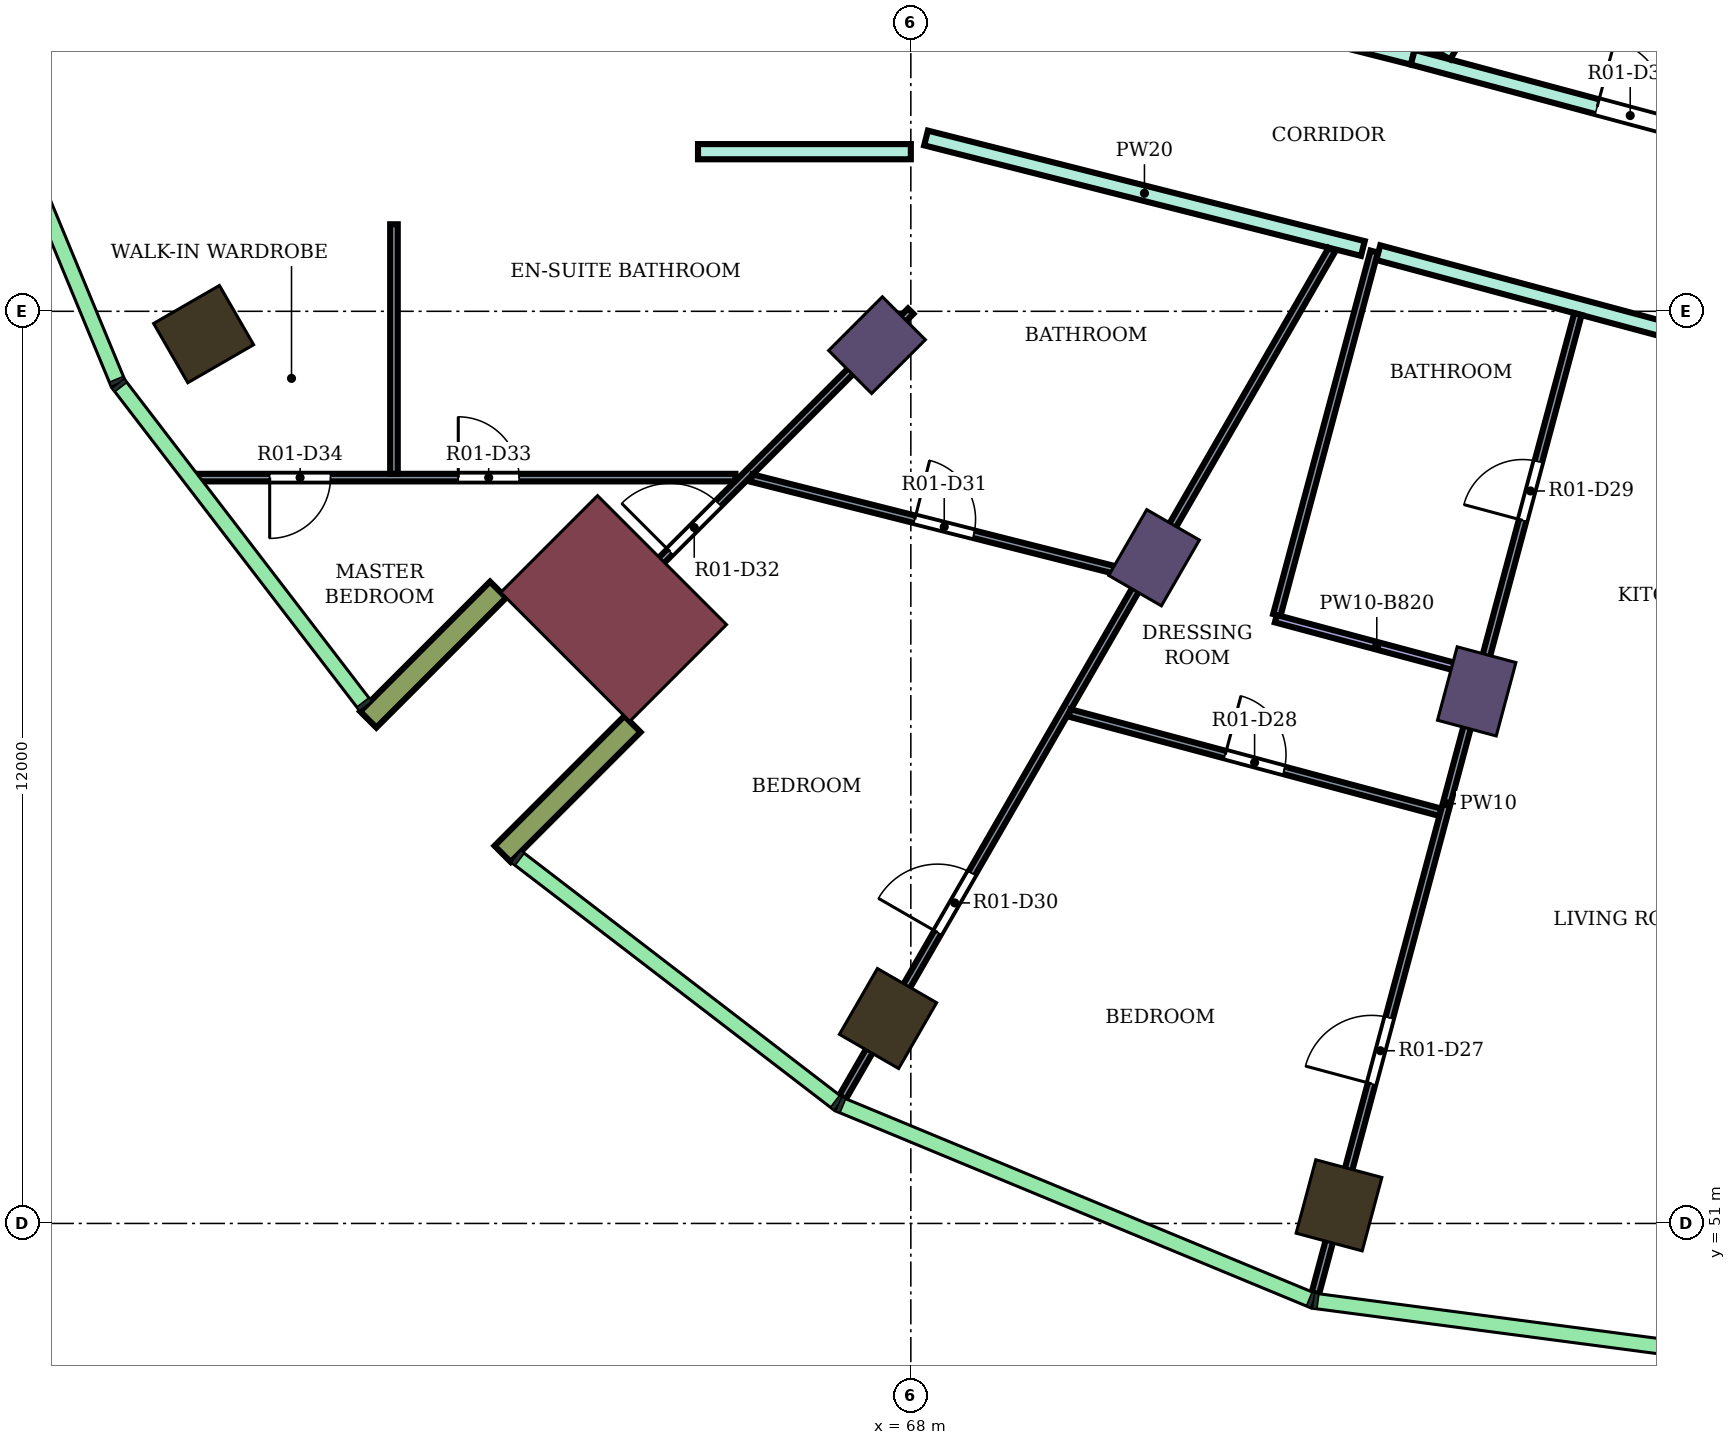
"""IFC4 building model, lengths in metres.
Left out: names, types, materials, properties, quantities, classifications, styles, units other than length and angle.
Written with IfcOpenShell. Run it as: python <this file> out.ifc"""

import sys

from ifc_helpers import new_model, si_unit, direction, frame, frame_2d, origin, origin_2d, place, context, subcontext, project, spatial, rectangle, extrude, element, fill, save


model = new_model("IFC4")
c1 = context("Model", 3, precision=1e-05, world=origin(), true_north=direction((0.0, 1.0)))
c2 = subcontext(c1, "Body", "Model", "MODEL_VIEW")
j1 = project(units=[si_unit("LENGTHUNIT", "METRE"), si_unit("PLANEANGLEUNIT", "RADIAN")], contexts=[c1])
p1 = place(None, origin())
s1 = spatial("IfcSite", under=j1, at=p1, CompositionType="ELEMENT")
p2 = place(p1, origin())
s2 = spatial("IfcBuilding", under=s1, at=p2, CompositionType="ELEMENT")
p3 = place(p2, frame((0.0, 0.0, 161.8)))
s3 = spatial("IfcBuildingStorey", under=s2, at=p3, CompositionType="ELEMENT", Elevation=161.8)
for number, where, z_axis, x_axis in (
    (1, (58.696, 62.7, 0.0), (0.0, 0.0, 1.0), (-0.866, -0.5, 0.0)),
    (2, (67.7, 53.696, 0.0), (0.0, 0.0, 1.0), (-0.5, -0.866, 0.0)),
    (3, (73.633, 51.238, 0.0), (0.0, 0.0, 1.0), (-0.259, -0.966, 0.0)),
):
    element("IfcColumn", number, at=place(p3, frame(where, z_axis=z_axis, x_axis=x_axis)), inside=s3, PredefinedType="COLUMN", context=c2, shape_type="SweptSolid", body=[
        extrude(rectangle(XDim=1.0, YDim=0.9, at=origin_2d()), origin(), (0.0, 0.0, 1.0), 4.1),
    ])
for number, where, z_axis, x_axis in (
    (4, (67.555, 62.555, 0.0), (0.0, 0.0, 1.0), (-0.707, -0.707, 0.0)),
    (5, (71.2, 59.758, 0.0), (0.0, 0.0, 1.0), (-0.5, -0.866, 0.0)),
    (6, (75.445, 58.0, 0.0), (0.0, 0.0, 1.0), (-0.259, -0.966, 0.0)),
):
    element("IfcColumn", number, at=place(p3, frame(where, z_axis=z_axis, x_axis=x_axis)), inside=s3, PredefinedType="COLUMN", context=c2, shape_type="SweptSolid", body=[
        extrude(rectangle(XDim=1.0, YDim=0.8, at=origin_2d()), origin(), (0.0, 0.0, 1.0), 4.1),
    ])
p4 = place(p3, frame((64.09, 59.09, 0.0), z_axis=(0.0, 0.0, 1.0), x_axis=(-0.707106781187, -0.707106781187, 0.0)))
e7 = element("IfcColumn", 7, at=p4, inside=s3, PredefinedType="COLUMN", context=c2, shape_type="SweptSolid", body=[
    extrude(rectangle(XDim=1.8, YDim=2.4, at=origin_2d()), origin(), (0.0, 0.0, 1.0), 4.1),
])
for number, where, z_axis, x_axis in (
    (8, (62.57, 59.338, 0.0), (0.0, 0.0, 1.0), (-0.707, -0.707, 0.0)),
    (9, (64.338, 57.57, 0.0), (0.0, 0.0, 1.0), (-0.707, -0.707, 0.0)),
):
    element("IfcWall", number, at=place(p3, frame(where, z_axis=z_axis, x_axis=x_axis)), inside=s3, PredefinedType="NOTDEFINED", context=c2, shape_type="SweptSolid", body=[
        extrude(rectangle(XDim=2.416, YDim=0.3, at=frame_2d((1.208, 0.0))), origin(), (0.0, 0.0, 1.0), 4.1),
    ])
p5 = place(p3, frame((65.2, 65.1, 0.0), z_axis=(0.0, 0.0, 1.0), x_axis=(1.0, 0.0, 0.0)))
e10 = element("IfcWall", 10, at=p5, inside=s3, PredefinedType="PARTITIONING", context=c2, shape_type="SweptSolid", body=[
    extrude(rectangle(XDim=2.8, YDim=0.2, at=frame_2d((1.4, 0.0))), origin(), (0.0, 0.0, 1.0), 3.65),
])
p6 = place(p3, frame((68.2, 65.28, 0.0), z_axis=(0.0, 0.0, 1.0), x_axis=(0.969450596516, -0.245286650503, 0.0)))
e11 = element("IfcWall", 11, at=p6, inside=s3, PredefinedType="PARTITIONING", context=c2, shape_type="SweptSolid", body=[
    extrude(rectangle(XDim=5.928, YDim=0.2, at=frame_2d((2.964, 0.0))), origin(), (0.0, 0.0, 1.0), 3.65),
])
p7 = place(p3, frame((72.1, 66.975, 0.0), z_axis=(0.0, 0.0, 1.0), x_axis=(0.969471314457, -0.245204752086, 0.0)))
e12 = element("IfcWall", 12, at=p7, inside=s3, PredefinedType="PARTITIONING", context=c2, shape_type="SweptSolid", body=[
    extrude(rectangle(XDim=2.582, YDim=0.2, at=frame_2d((1.291, 0.0))), origin(), (0.0, 0.0, 1.0), 3.65),
])
p8 = place(p7, frame((0.841, 0.0, 0.0)))
e13 = element("IfcOpeningElement", 13, at=p8, cuts=e12, PredefinedType="OPENING", context=c2, shape_type="SweptSolid", body=[
    extrude(rectangle(XDim=0.9, YDim=2.1, at=frame_2d((0.45, 1.05))), frame((0.0, 0.11, 0.0), z_axis=(0.0, -1.0, 0.0), x_axis=(1.0, 0.0, 0.0)), (0.0, 0.0, 1.0), 0.22),
])
p9 = place(p3, frame((74.15, 63.772, 0.0), z_axis=(0.0, 0.0, 1.0), x_axis=(0.965807109237, -0.259261697417, 0.0)))
e14 = element("IfcWall", 14, at=p9, inside=s3, PredefinedType="PARTITIONING", context=c2, shape_type="SweptSolid", body=[
    extrude(rectangle(XDim=5.967, YDim=0.2, at=frame_2d((2.983, 0.0))), origin(), (0.0, 0.0, 1.0), 3.65),
])
p10 = place(p9, frame((4.507, 0.0, 0.0)))
e15 = element("IfcOpeningElement", 15, at=p10, cuts=e14, PredefinedType="OPENING", context=c2, shape_type="SweptSolid", body=[
    extrude(rectangle(XDim=1.0, YDim=2.1, at=frame_2d((0.5, 1.05))), frame((0.0, 0.11, 0.0), z_axis=(0.0, -1.0, 0.0), x_axis=(1.0, 0.0, 0.0)), (0.0, 0.0, 1.0), 0.22),
])
p11 = place(p3, frame((74.603, 66.342, 0.0), z_axis=(0.0, 0.0, 1.0), x_axis=(0.965920893652, -0.258837453254, 0.0)))
e16 = element("IfcWall", 16, at=p11, inside=s3, PredefinedType="PARTITIONING", context=c2, shape_type="SweptSolid", body=[
    extrude(rectangle(XDim=5.458, YDim=0.2, at=frame_2d((2.729, 0.0))), origin(), (0.0, 0.0, 1.0), 3.65),
])
p12 = place(p11, frame((2.512, 0.0, 0.0)))
e17 = element("IfcOpeningElement", 17, at=p12, cuts=e16, PredefinedType="OPENING", context=c2, shape_type="SweptSolid", body=[
    extrude(rectangle(XDim=0.9, YDim=2.1, at=frame_2d((0.45, 1.05))), frame((0.0, 0.11, 0.0), z_axis=(0.0, -1.0, 0.0), x_axis=(1.0, 0.0, 0.0)), (0.0, 0.0, 1.0), 0.22),
])
p13 = place(p3, frame((75.01, 66.364, 0.0), z_axis=(0.0, 0.0, 1.0), x_axis=(0.50017749597, 0.865922902183, 0.0)))
e18 = element("IfcWall", 18, at=p13, inside=s3, PredefinedType="PARTITIONING", context=c2, shape_type="SweptSolid", body=[
    extrude(rectangle(XDim=2.276, YDim=0.2, at=frame_2d((1.138, 0.0))), origin(), (0.0, 0.0, 1.0), 3.65),
])
p14 = place(p3, frame((58.6, 60.812, 0.0), z_axis=(0.0, 0.0, 1.0), x_axis=(1.0, 0.0, 0.0)))
e19 = element("IfcWall", 19, at=p14, inside=s3, PredefinedType="PARTITIONING", context=c2, shape_type="SweptSolid", body=[
    extrude(rectangle(XDim=7.092, YDim=0.1, at=frame_2d((3.546, 0.0))), origin(), (0.0, 0.0, 1.0), 3.65),
])
p15 = place(p14, frame((3.446, 0.0, 0.0)))
e20 = element("IfcOpeningElement", 20, at=p15, cuts=e19, PredefinedType="OPENING", context=c2, shape_type="SweptSolid", body=[
    extrude(rectangle(XDim=0.8, YDim=2.1, at=frame_2d((0.4, 1.05))), frame((0.0, 0.06, 0.0), z_axis=(0.0, -1.0, 0.0), x_axis=(1.0, 0.0, 0.0)), (0.0, 0.0, 1.0), 0.12),
])
p16 = place(p14, frame((0.965, 0.0, 0.0)))
e21 = element("IfcOpeningElement", 21, at=p16, cuts=e19, PredefinedType="OPENING", context=c2, shape_type="SweptSolid", body=[
    extrude(rectangle(XDim=0.8, YDim=2.1, at=frame_2d((0.4, 1.05))), frame((0.0, 0.06, 0.0), z_axis=(0.0, -1.0, 0.0), x_axis=(1.0, 0.0, 0.0)), (0.0, 0.0, 1.0), 0.12),
])
p17 = place(p3, frame((61.2, 60.862, 0.0), z_axis=(0.0, 0.0, 1.0), x_axis=(0.0, 1.0, 0.0)))
e22 = element("IfcWall", 22, at=p17, inside=s3, PredefinedType="PARTITIONING", context=c2, shape_type="SweptSolid", body=[
    extrude(rectangle(XDim=3.283, YDim=0.1, at=frame_2d((1.642, 0.0))), origin(), (0.0, 0.0, 1.0), 3.65),
])
p18 = place(p3, frame((63.593, 58.598, 0.0), z_axis=(0.0, 0.0, 1.0), x_axis=(0.707243952197, 0.706969583561, 0.0)))
e23 = element("IfcWall", 23, at=p18, inside=s3, PredefinedType="PARTITIONING", context=c2, shape_type="SweptSolid", body=[
    extrude(rectangle(XDim=6.229, YDim=0.1, at=frame_2d((3.114, 0.0))), origin(), (0.0, 0.0, 1.0), 3.65),
])
p19 = place(p18, frame((1.752, 0.0, 0.0)))
e24 = element("IfcOpeningElement", 24, at=p19, cuts=e23, PredefinedType="OPENING", context=c2, shape_type="SweptSolid", body=[
    extrude(rectangle(XDim=0.9, YDim=2.1, at=frame_2d((0.45, 1.05))), frame((0.0, 0.06, 0.0), z_axis=(0.0, -1.0, 0.0), x_axis=(1.0, 0.0, 0.0)), (0.0, 0.0, 1.0), 0.12),
])
p20 = place(p3, frame((65.904, 60.806, 0.0), z_axis=(0.0, 0.0, 1.0), x_axis=(0.969477107154, -0.245181848237, 0.0)))
e25 = element("IfcWall", 25, at=p20, inside=s3, PredefinedType="PARTITIONING", context=c2, shape_type="SweptSolid", body=[
    extrude(rectangle(XDim=5.252, YDim=0.1, at=frame_2d((2.626, 0.0))), origin(), (0.0, 0.0, 1.0), 3.65),
])
p21 = place(p20, frame((2.216, 0.0, 0.0)))
e26 = element("IfcOpeningElement", 26, at=p21, cuts=e25, PredefinedType="OPENING", context=c2, shape_type="SweptSolid", body=[
    extrude(rectangle(XDim=0.8, YDim=2.1, at=frame_2d((0.4, 1.05))), frame((0.0, 0.06, 0.0), z_axis=(0.0, -1.0, 0.0), x_axis=(1.0, 0.0, 0.0)), (0.0, 0.0, 1.0), 0.12),
])
p22 = place(p3, frame((67.101, 52.659, 0.0), z_axis=(0.0, 0.0, 1.0), x_axis=(0.499985055897, 0.866034031594, 0.0)))
e27 = element("IfcWall", 27, at=p22, inside=s3, PredefinedType="PARTITIONING", context=c2, shape_type="SweptSolid", body=[
    extrude(rectangle(XDim=12.876, YDim=0.1, at=frame_2d((6.438, 0.0))), origin(), (0.0, 0.0, 1.0), 3.65),
])
p23 = place(p22, frame((2.504, 0.0, 0.0)))
e28 = element("IfcOpeningElement", 28, at=p23, cuts=e27, PredefinedType="OPENING", context=c2, shape_type="SweptSolid", body=[
    extrude(rectangle(XDim=0.9, YDim=2.1, at=frame_2d((0.45, 1.05))), frame((0.0, 0.06, 0.0), z_axis=(0.0, -1.0, 0.0), x_axis=(1.0, 0.0, 0.0)), (0.0, 0.0, 1.0), 0.12),
])
p24 = place(p3, frame((70.088, 57.717, 0.0), z_axis=(0.0, 0.0, 1.0), x_axis=(0.965906836082, -0.258889907124, 0.0)))
e29 = element("IfcWall", 29, at=p24, inside=s3, PredefinedType="PARTITIONING", context=c2, shape_type="SweptSolid", body=[
    extrude(rectangle(XDim=5.051, YDim=0.1, at=frame_2d((2.525, 0.0))), origin(), (0.0, 0.0, 1.0), 3.65),
])
p25 = place(p24, frame((2.121, 0.0, 0.0)))
e30 = element("IfcOpeningElement", 30, at=p25, cuts=e29, PredefinedType="OPENING", context=c2, shape_type="SweptSolid", body=[
    extrude(rectangle(XDim=0.8, YDim=2.1, at=frame_2d((0.4, 1.05))), frame((0.0, 0.06, 0.0), z_axis=(0.0, -1.0, 0.0), x_axis=(1.0, 0.0, 0.0)), (0.0, 0.0, 1.0), 0.12),
])
p26 = place(p3, frame((72.815, 59.004, 0.0), z_axis=(0.0, 0.0, 1.0), x_axis=(0.25878292514, 0.96593550388, 0.0)))
e31 = element("IfcWall", 31, at=p26, inside=s3, PredefinedType="PARTITIONING", context=c2, shape_type="SweptSolid", body=[
    extrude(rectangle(XDim=4.95, YDim=0.1, at=frame_2d((2.475, 0.0))), origin(), (0.0, 0.0, 1.0), 3.65),
])
p27 = place(p3, frame((72.802, 58.956, 0.0), z_axis=(0.0, 0.0, 1.0), x_axis=(0.965887802097, -0.258960911647, 0.0)))
e32 = element("IfcWall", 32, at=p27, inside=s3, PredefinedType="PARTITIONING", context=c2, shape_type="SweptSolid", body=[
    extrude(rectangle(XDim=2.75, YDim=0.1, at=frame_2d((1.375, 0.0))), origin(), (0.0, 0.0, 1.0), 3.28),
])
p28 = place(p3, frame((73.322, 50.081, 0.0), z_axis=(0.0, 0.0, 1.0), x_axis=(0.258982801816, 0.965881932931, 0.0)))
e33 = element("IfcWall", 33, at=p28, inside=s3, PredefinedType="PARTITIONING", context=c2, shape_type="SweptSolid", body=[
    extrude(rectangle(XDim=13.338, YDim=0.1, at=frame_2d((6.669, 0.0))), origin(), (0.0, 0.0, 1.0), 3.65),
])
p29 = place(p28, frame((2.854, 0.0, 0.0)))
e34 = element("IfcOpeningElement", 34, at=p29, cuts=e33, PredefinedType="OPENING", context=c2, shape_type="SweptSolid", body=[
    extrude(rectangle(XDim=0.9, YDim=2.1, at=frame_2d((0.45, 1.05))), frame((0.0, 0.06, 0.0), z_axis=(0.0, -1.0, 0.0), x_axis=(1.0, 0.0, 0.0)), (0.0, 0.0, 1.0), 0.12),
])
p30 = place(p28, frame((10.528, 0.0, 0.0)))
e35 = element("IfcOpeningElement", 35, at=p30, cuts=e33, PredefinedType="OPENING", context=c2, shape_type="SweptSolid", body=[
    extrude(rectangle(XDim=0.8, YDim=2.1, at=frame_2d((0.4, 1.05))), frame((0.0, 0.06, 0.0), z_axis=(0.0, -1.0, 0.0), x_axis=(1.0, 0.0, 0.0)), (0.0, 0.0, 1.0), 0.12),
])
p31 = place(p29, origin())
e36 = element("IfcDoor", 36, at=p31, inside=s3, OperationType="SINGLE_SWING_LEFT", PredefinedType="DOOR", context=c2, shape_type="SweptSolid", body=[
    extrude(rectangle(XDim=0.9, YDim=2.1, at=frame_2d((0.45, 1.05))), frame((0.0, 0.025, 0.0), z_axis=(0.0, -1.0, 0.0), x_axis=(1.0, 0.0, 0.0)), (0.0, 0.0, 1.0), 0.05),
])
fill(e34, e36)
p32 = place(p25, origin())
e37 = element("IfcDoor", 37, at=p32, inside=s3, OperationType="SINGLE_SWING_LEFT", PredefinedType="DOOR", context=c2, shape_type="SweptSolid", body=[
    extrude(rectangle(XDim=0.8, YDim=2.1, at=frame_2d((0.4, 1.05))), frame((0.0, 0.025, 0.0), z_axis=(0.0, -1.0, 0.0), x_axis=(1.0, 0.0, 0.0)), (0.0, 0.0, 1.0), 0.05),
])
fill(e30, e37)
p33 = place(p30, origin())
e38 = element("IfcDoor", 38, at=p33, inside=s3, OperationType="SINGLE_SWING_LEFT", PredefinedType="DOOR", context=c2, shape_type="SweptSolid", body=[
    extrude(rectangle(XDim=0.8, YDim=2.1, at=frame_2d((0.4, 1.05))), frame((0.0, 0.025, 0.0), z_axis=(0.0, -1.0, 0.0), x_axis=(1.0, 0.0, 0.0)), (0.0, 0.0, 1.0), 0.05),
])
fill(e35, e38)
p34 = place(p23, origin())
e39 = element("IfcDoor", 39, at=p34, inside=s3, OperationType="SINGLE_SWING_LEFT", PredefinedType="DOOR", context=c2, shape_type="SweptSolid", body=[
    extrude(rectangle(XDim=0.9, YDim=2.1, at=frame_2d((0.45, 1.05))), frame((0.0, 0.025, 0.0), z_axis=(0.0, -1.0, 0.0), x_axis=(1.0, 0.0, 0.0)), (0.0, 0.0, 1.0), 0.05),
])
fill(e28, e39)
p35 = place(p21, origin())
e40 = element("IfcDoor", 40, at=p35, inside=s3, OperationType="SINGLE_SWING_LEFT", PredefinedType="DOOR", context=c2, shape_type="SweptSolid", body=[
    extrude(rectangle(XDim=0.8, YDim=2.1, at=frame_2d((0.4, 1.05))), frame((0.0, 0.025, 0.0), z_axis=(0.0, -1.0, 0.0), x_axis=(1.0, 0.0, 0.0)), (0.0, 0.0, 1.0), 0.05),
])
fill(e26, e40)
p36 = place(p19, origin())
e41 = element("IfcDoor", 41, at=p36, inside=s3, OperationType="SINGLE_SWING_LEFT", PredefinedType="DOOR", context=c2, shape_type="SweptSolid", body=[
    extrude(rectangle(XDim=0.9, YDim=2.1, at=frame_2d((0.45, 1.05))), frame((0.0, 0.025, 0.0), z_axis=(0.0, -1.0, 0.0), x_axis=(1.0, 0.0, 0.0)), (0.0, 0.0, 1.0), 0.05),
])
fill(e24, e41)
p37 = place(p15, origin())
e42 = element("IfcDoor", 42, at=p37, inside=s3, OperationType="SINGLE_SWING_LEFT", PredefinedType="DOOR", context=c2, shape_type="SweptSolid", body=[
    extrude(rectangle(XDim=0.8, YDim=2.1, at=frame_2d((0.4, 1.05))), frame((0.0, 0.025, 0.0), z_axis=(0.0, -1.0, 0.0), x_axis=(1.0, 0.0, 0.0)), (0.0, 0.0, 1.0), 0.05),
])
fill(e20, e42)
p38 = place(p16, frame((0.8, 0.0, 0.0), z_axis=(0.0, 0.0, 1.0), x_axis=(-1.0, 0.0, 0.0)))
e43 = element("IfcDoor", 43, at=p38, inside=s3, OperationType="SINGLE_SWING_RIGHT", PredefinedType="DOOR", context=c2, shape_type="SweptSolid", body=[
    extrude(rectangle(XDim=0.8, YDim=2.1, at=frame_2d((0.4, 1.05))), frame((0.0, 0.025, 0.0), z_axis=(0.0, -1.0, 0.0), x_axis=(1.0, 0.0, 0.0)), (0.0, 0.0, 1.0), 0.05),
])
fill(e21, e43)
p39 = place(p12, origin())
e44 = element("IfcDoor", 44, at=p39, inside=s3, OperationType="SINGLE_SWING_LEFT", PredefinedType="DOOR", context=c2, shape_type="SweptSolid", body=[
    extrude(rectangle(XDim=0.9, YDim=2.1, at=frame_2d((0.45, 1.05))), frame((0.0, 0.025, 0.0), z_axis=(0.0, -1.0, 0.0), x_axis=(1.0, 0.0, 0.0)), (0.0, 0.0, 1.0), 0.05),
])
fill(e17, e44)
save(model, sys.argv[1])
